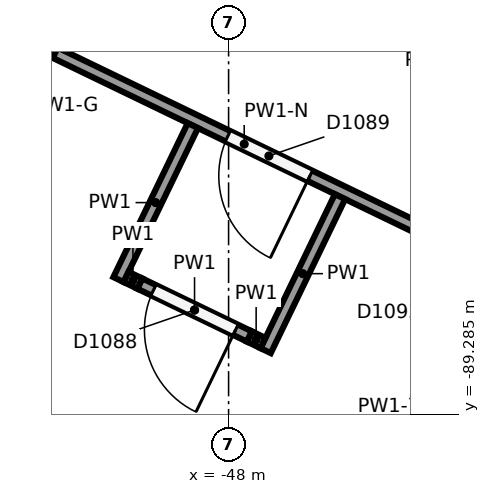
"""IFC4 building model, lengths in metres.
Left out: names, types, materials, properties, quantities, classifications, styles, units other than length and angle.
Written with IfcOpenShell. Run it as: python <this file> out.ifc"""

import sys

from ifc_helpers import new_model, si_unit, direction, frame, frame_2d, origin, place, context, subcontext, project, spatial, rectangle, extrude, element, fill, save


model = new_model("IFC4")
c1 = context("Model", 3, precision=1e-05, world=origin(), true_north=direction((0.0, 1.0)))
c2 = subcontext(c1, "Body", "Model", "MODEL_VIEW")
j1 = project(units=[si_unit("LENGTHUNIT", "METRE"), si_unit("PLANEANGLEUNIT", "RADIAN")], contexts=[c1])
p1 = place(None, origin())
s1 = spatial("IfcSite", under=j1, at=p1, CompositionType="ELEMENT")
p2 = place(p1, origin())
s2 = spatial("IfcBuilding", under=s1, at=p2, CompositionType="ELEMENT")
p3 = place(p2, frame((0.0, 0.0, 12.0)))
s3 = spatial("IfcBuildingStorey", under=s2, at=p3, CompositionType="ELEMENT", Elevation=12.0)
p4 = place(p3, frame((-45.308, -86.931, 0.0), z_axis=(0.0, 0.0, 1.0), x_axis=(-0.90052298219, 0.434808415911, 0.0)))
e1 = element("IfcWall", 1, at=p4, inside=s3, PredefinedType="PARTITIONING", context=c2, shape_type="SweptSolid", body=[
    extrude(rectangle(XDim=5.522, YDim=0.15, at=frame_2d((2.761, 0.0))), origin(), (0.0, 0.0, 1.0), 3.697),
])
p5 = place(p4, frame((1.8, 0.0, 0.0)))
e2 = element("IfcOpeningElement", 2, at=p5, cuts=e1, PredefinedType="OPENING", context=c2, shape_type="SweptSolid", body=[
    extrude(rectangle(XDim=1.2, YDim=2.1, at=frame_2d((0.6, 1.05))), frame((0.0, 0.085, 0.0), z_axis=(0.0, -1.0, 0.0), x_axis=(1.0, 0.0, 0.0)), (0.0, 0.0, 1.0), 0.17),
])
for number, where, z_axis, x_axis in (
    (3, (-46.534, -86.423, 0.0), (0.0, 0.0, 1.0), (-0.435, -0.901, 0.0)),
    (4, (-48.47, -85.488, 0.0), (0.0, 0.0, 1.0), (-0.435, -0.901, 0.0)),
):
    element("IfcWall", number, at=place(p3, frame(where, z_axis=z_axis, x_axis=x_axis)), inside=s3, PredefinedType="PARTITIONING", context=c2, shape_type="SweptSolid", body=[
        extrude(rectangle(XDim=2.25, YDim=0.15, at=frame_2d((1.125, 0.0))), origin(), (0.0, 0.0, 1.0), 5.65),
    ])
p6 = place(p3, frame((-47.547, -88.349, 0.0), z_axis=(0.0, 0.0, 1.0), x_axis=(-0.900205528442, 0.435465275954, 0.0)))
e5 = element("IfcWall", 5, at=p6, inside=s3, PredefinedType="PARTITIONING", context=c2, shape_type="SweptSolid", body=[
    extrude(rectangle(XDim=0.2, YDim=0.15, at=frame_2d((0.1, 0.0))), origin(), (0.0, 0.0, 1.0), 5.65),
])
p7 = place(p3, frame((-47.728, -88.262, 0.0), z_axis=(0.0, 0.0, 1.0), x_axis=(-0.90053721394, 0.434778939589, 0.0)))
e6 = element("IfcWall", 6, at=p7, inside=s3, PredefinedType="PARTITIONING", context=c2, shape_type="SweptSolid", body=[
    extrude(rectangle(XDim=1.6, YDim=0.15, at=frame_2d((0.8, 0.0))), origin(), (0.0, 0.0, 1.0), 5.65),
])
p8 = place(p7, frame((0.2, 0.0, 0.0)))
e7 = element("IfcOpeningElement", 7, at=p8, cuts=e6, PredefinedType="OPENING", context=c2, shape_type="SweptSolid", body=[
    extrude(rectangle(XDim=1.2, YDim=2.1, at=frame_2d((0.6, 1.05))), frame((0.0, 0.085, 0.0), z_axis=(0.0, -1.0, 0.0), x_axis=(1.0, 0.0, 0.0)), (0.0, 0.0, 1.0), 0.17),
])
p9 = place(p3, frame((-49.168, -87.566, 0.0), z_axis=(0.0, 0.0, 1.0), x_axis=(-0.900205528442, 0.435465275954, 0.0)))
e8 = element("IfcWall", 8, at=p9, inside=s3, PredefinedType="PARTITIONING", context=c2, shape_type="SweptSolid", body=[
    extrude(rectangle(XDim=0.2, YDim=0.15, at=frame_2d((0.1, 0.0))), origin(), (0.0, 0.0, 1.0), 5.65),
])
p10 = place(p5, origin())
e9 = element("IfcDoor", 9, at=p10, inside=s3, OperationType="SINGLE_SWING_LEFT", PredefinedType="DOOR", context=c2, shape_type="SweptSolid", body=[
    extrude(rectangle(XDim=1.2, YDim=2.1, at=frame_2d((0.6, 1.05))), frame((0.0, 0.025, 0.0), z_axis=(0.0, -1.0, 0.0), x_axis=(1.0, 0.0, 0.0)), (0.0, 0.0, 1.0), 0.05),
])
fill(e2, e9)
p11 = place(p8, origin())
e10 = element("IfcDoor", 10, at=p11, inside=s3, OperationType="SINGLE_SWING_LEFT", PredefinedType="DOOR", context=c2, shape_type="SweptSolid", body=[
    extrude(rectangle(XDim=1.2, YDim=2.1, at=frame_2d((0.6, 1.05))), frame((0.0, 0.025, 0.0), z_axis=(0.0, -1.0, 0.0), x_axis=(1.0, 0.0, 0.0)), (0.0, 0.0, 1.0), 0.05),
])
fill(e7, e10)
save(model, sys.argv[1])
